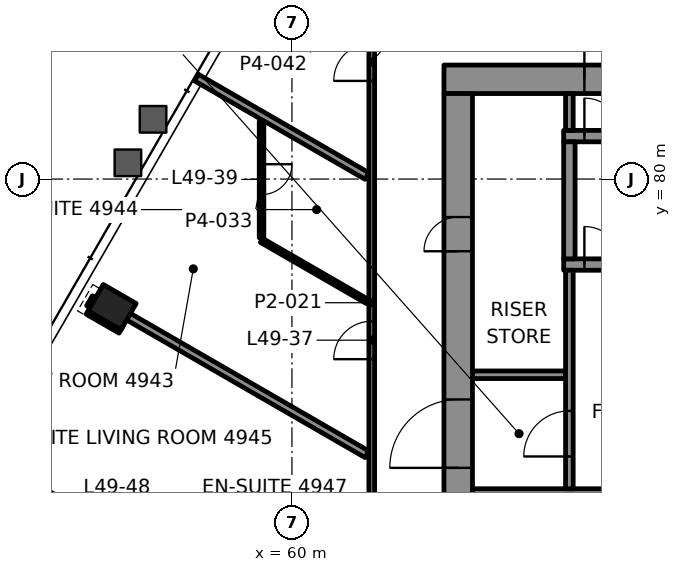
"""IFC4 building model, lengths in metres.
Left out: names, types, materials, properties, quantities, classifications, styles, units other than length and angle.
Written with IfcOpenShell. Run it as: python <this file> out.ifc"""

import sys

from ifc_helpers import new_model, si_unit, direction, frame, frame_2d, origin, origin_2d, place, context, subcontext, project, spatial, rectangle, hollow_rectangle, extrude, element, fill, save


model = new_model("IFC4")
c1 = context("Model", 3, precision=1e-05, world=origin(), true_north=direction((0.0, 1.0)))
c2 = subcontext(c1, "Body", "Model", "MODEL_VIEW")
j1 = project(units=[si_unit("LENGTHUNIT", "METRE"), si_unit("PLANEANGLEUNIT", "RADIAN")], contexts=[c1])
p1 = place(None, origin())
s1 = spatial("IfcSite", under=j1, at=p1, CompositionType="ELEMENT")
p2 = place(p1, origin())
s2 = spatial("IfcBuilding", under=s1, at=p2, CompositionType="ELEMENT")
p3 = place(p2, frame((0.0, 0.0, 210.4)))
s3 = spatial("IfcBuildingStorey", under=s2, at=p3, CompositionType="ELEMENT", Elevation=210.4)
p4 = place(p3, frame((55.268, 76.628, -0.0), z_axis=(0.0, 0.0, 1.0), x_axis=(-0.5, -0.866025403784, 0.0)))
e1 = element("IfcColumn", 1, at=p4, inside=s3, PredefinedType="COLUMN", context=c2, shape_type="SweptSolid", body=[
    extrude(hollow_rectangle(XDim=0.8, YDim=1.0, WallThickness=0.05, at=origin_2d()), origin(), (0.0, 0.0, 1.0), 3.9),
])
p5 = place(p3, frame((64.0, 82.625, 0.0), z_axis=(0.0, 0.0, 1.0), x_axis=(1.0, 0.0, 0.0)))
e2 = element("IfcWall", 2, at=p5, inside=s3, PredefinedType="SHEAR", context=c2, shape_type="SweptSolid", body=[
    extrude(rectangle(XDim=22.0, YDim=0.75, at=frame_2d((11.0, 0.0))), origin(), (0.0, 0.0, 1.0), 3.7),
])
p6 = place(p5, frame((3.695, 0.0, 0.0)))
e3 = element("IfcOpeningElement", 3, at=p6, cuts=e2, PredefinedType="OPENING", context=c2, shape_type="SweptSolid", body=[
    extrude(rectangle(XDim=1.0, YDim=2.1, at=frame_2d((0.5, 1.05))), frame((0.0, 0.385, 0.0), z_axis=(0.0, -1.0, 0.0), x_axis=(1.0, 0.0, 0.0)), (0.0, 0.0, 1.0), 0.77),
])
p7 = place(p5, frame((17.505, 0.0, 0.0)))
e4 = element("IfcOpeningElement", 4, at=p7, cuts=e2, PredefinedType="OPENING", context=c2, shape_type="SweptSolid", body=[
    extrude(rectangle(XDim=1.0, YDim=2.1, at=frame_2d((0.5, 1.05))), frame((0.0, 0.385, 0.0), z_axis=(0.0, -1.0, 0.0), x_axis=(1.0, 0.0, 0.0)), (0.0, 0.0, 1.0), 0.77),
])
p8 = place(p5, frame((10.65, 0.0, 0.0)))
e5 = element("IfcOpeningElement", 5, at=p8, cuts=e2, PredefinedType="OPENING", context=c2, shape_type="SweptSolid", body=[
    extrude(rectangle(XDim=0.9, YDim=2.1, at=frame_2d((0.45, 1.05))), frame((0.0, 0.385, 0.0), z_axis=(0.0, -1.0, 0.0), x_axis=(1.0, 0.0, 0.0)), (0.0, 0.0, 1.0), 0.77),
])
p9 = place(p3, frame((64.375, 67.75, 0.0), z_axis=(0.0, 0.0, 1.0), x_axis=(0.0, 1.0, 0.0)))
e6 = element("IfcWall", 6, at=p9, inside=s3, PredefinedType="SHEAR", context=c2, shape_type="SweptSolid", body=[
    extrude(rectangle(XDim=14.5, YDim=0.75, at=frame_2d((7.25, 0.0))), origin(), (0.0, 0.0, 1.0), 3.7),
])
p10 = place(p9, frame((4.65, 0.0, 0.0)))
e7 = element("IfcOpeningElement", 7, at=p10, cuts=e6, PredefinedType="OPENING", context=c2, shape_type="SweptSolid", body=[
    extrude(rectangle(XDim=1.8, YDim=2.1, at=frame_2d((0.9, 1.05))), frame((0.0, 0.385, 0.0), z_axis=(0.0, -1.0, 0.0), x_axis=(1.0, 0.0, 0.0)), (0.0, 0.0, 1.0), 0.77),
])
p11 = place(p9, frame((2.55, 0.0, 0.0)))
e8 = element("IfcOpeningElement", 8, at=p11, cuts=e6, PredefinedType="OPENING", context=c2, shape_type="SweptSolid", body=[
    extrude(rectangle(XDim=0.9, YDim=2.1, at=frame_2d((0.45, 1.05))), frame((0.0, 0.385, 0.0), z_axis=(0.0, -1.0, 0.0), x_axis=(1.0, 0.0, 0.0)), (0.0, 0.0, 1.0), 0.77),
])
p12 = place(p9, frame((10.35, 0.0, 0.0)))
e9 = element("IfcOpeningElement", 9, at=p12, cuts=e6, PredefinedType="OPENING", context=c2, shape_type="SweptSolid", body=[
    extrude(rectangle(XDim=0.9, YDim=2.1, at=frame_2d((0.45, 1.05))), frame((0.0, 0.385, 0.0), z_axis=(0.0, -1.0, 0.0), x_axis=(1.0, 0.0, 0.0)), (0.0, 0.0, 1.0), 0.77),
])
p13 = place(p3, frame((67.15, 77.75, 0.0), z_axis=(0.0, 0.0, 1.0), x_axis=(1.0, 0.0, 0.0)))
e10 = element("IfcWall", 10, at=p13, inside=s3, PredefinedType="SHEAR", context=c2, shape_type="SweptSolid", body=[
    extrude(rectangle(XDim=17.45, YDim=0.3, at=frame_2d((8.725, 0.0))), origin(), (0.0, 0.0, 1.0), 3.7),
])
p14 = place(p13, frame((0.545, 0.0, 0.0)))
e11 = element("IfcOpeningElement", 11, at=p14, cuts=e10, PredefinedType="OPENING", context=c2, shape_type="SweptSolid", body=[
    extrude(rectangle(XDim=1.0, YDim=2.1, at=frame_2d((0.5, 1.05))), frame((0.0, 0.16, 0.0), z_axis=(0.0, -1.0, 0.0), x_axis=(1.0, 0.0, 0.0)), (0.0, 0.0, 1.0), 0.32),
])
p15 = place(p3, frame((67.15, 81.13, 0.0), z_axis=(0.0, 0.0, 1.0), x_axis=(1.0, 0.0, 0.0)))
e12 = element("IfcWall", 12, at=p15, inside=s3, PredefinedType="SHEAR", context=c2, shape_type="SweptSolid", body=[
    extrude(rectangle(XDim=6.91, YDim=0.3, at=frame_2d((3.455, 0.0))), origin(), (0.0, 0.0, 1.0), 3.7),
])
p16 = place(p15, frame((0.545, 0.0, 0.0)))
e13 = element("IfcOpeningElement", 13, at=p16, cuts=e12, PredefinedType="OPENING", context=c2, shape_type="SweptSolid", body=[
    extrude(rectangle(XDim=1.0, YDim=2.1, at=frame_2d((0.5, 1.05))), frame((0.0, 0.16, 0.0), z_axis=(0.0, -1.0, 0.0), x_axis=(1.0, 0.0, 0.0)), (0.0, 0.0, 1.0), 0.32),
])
p17 = place(p3, frame((67.3, 77.9, 0.0), z_axis=(0.0, 0.0, 1.0), x_axis=(0.0, 1.0, 0.0)))
e14 = element("IfcWall", 14, at=p17, inside=s3, PredefinedType="SHEAR", context=c2, shape_type="SweptSolid", body=[
    extrude(rectangle(XDim=3.08, YDim=0.3, at=frame_2d((1.54, 0.0))), origin(), (0.0, 0.0, 1.0), 3.7),
])
p18 = place(p3, frame((54.685, 76.619, 0.0), z_axis=(0.0, 0.0, 1.0), x_axis=(0.499816412211, 0.866131372301, 0.0)))
e15 = element("IfcWall", 15, at=p18, inside=s3, PredefinedType="PARTITIONING", context=c2, shape_type="SweptSolid", body=[
    extrude(rectangle(XDim=0.3, YDim=0.2, at=frame_2d((0.15, 0.0))), origin(), (0.0, 0.0, 1.0), 3.1),
])
p19 = place(p3, frame((62.1, 68.591, 0.0), z_axis=(0.0, 0.0, 1.0), x_axis=(0.0, 1.0, 0.0)))
e16 = element("IfcWall", 16, at=p19, inside=s3, PredefinedType="PARTITIONING", context=c2, shape_type="SweptSolid", body=[
    extrude(rectangle(XDim=16.309, YDim=0.15, at=frame_2d((8.154, 0.0))), origin(), (0.0, 0.0, 1.0), 3.1),
])
p20 = place(p19, frame((6.668, 0.0, 0.0)))
e17 = element("IfcOpeningElement", 17, at=p20, cuts=e16, PredefinedType="OPENING", context=c2, shape_type="SweptSolid", body=[
    extrude(rectangle(XDim=1.0, YDim=2.1, at=frame_2d((0.5, 1.05))), frame((0.0, 0.085, 0.0), z_axis=(0.0, -1.0, 0.0), x_axis=(1.0, 0.0, 0.0)), (0.0, 0.0, 1.0), 0.17),
])
p21 = place(p19, frame((13.991, 0.0, 0.0)))
e18 = element("IfcOpeningElement", 18, at=p21, cuts=e16, PredefinedType="OPENING", context=c2, shape_type="SweptSolid", body=[
    extrude(rectangle(XDim=1.0, YDim=2.1, at=frame_2d((0.5, 1.05))), frame((0.0, 0.085, 0.0), z_axis=(0.0, -1.0, 0.0), x_axis=(1.0, 0.0, 0.0)), (0.0, 0.0, 1.0), 0.17),
])
p22 = place(p3, frame((59.2, 81.526, 0.0), z_axis=(0.0, 0.0, 1.0), x_axis=(0.0, -1.0, 0.0)))
e19 = element("IfcWall", 19, at=p22, inside=s3, PredefinedType="PARTITIONING", context=c2, shape_type="SweptSolid", body=[
    extrude(rectangle(XDim=3.07, YDim=0.12, at=frame_2d((1.535, 0.0))), origin(), (0.0, 0.0, 1.0), 3.1),
])
p23 = place(p22, frame((1.135, 0.0, 0.0)))
e20 = element("IfcOpeningElement", 20, at=p23, cuts=e19, PredefinedType="OPENING", context=c2, shape_type="SweptSolid", body=[
    extrude(rectangle(XDim=0.8, YDim=2.1, at=frame_2d((0.4, 1.05))), frame((0.0, 0.07, 0.0), z_axis=(0.0, -1.0, 0.0), x_axis=(1.0, 0.0, 0.0)), (0.0, 0.0, 1.0), 0.14),
])
p24 = place(p3, frame((61.973, 80.08, 0.0), z_axis=(0.0, 0.0, 1.0), x_axis=(-0.86601608377, 0.500016142392, 0.0)))
e21 = element("IfcWall", 21, at=p24, inside=s3, PredefinedType="PARTITIONING", context=c2, shape_type="SweptSolid", body=[
    extrude(rectangle(XDim=5.181, YDim=0.2, at=frame_2d((2.59, 0.0))), origin(), (0.0, 0.0, 1.0), 3.022),
])
p25 = place(p3, frame((61.99, 76.775, 0.0), z_axis=(0.0, 0.0, 1.0), x_axis=(-0.866010186656, 0.500026355914, 0.0)))
e22 = element("IfcWall", 22, at=p25, inside=s3, PredefinedType="PARTITIONING", context=c2, shape_type="SweptSolid", body=[
    extrude(rectangle(XDim=3.222, YDim=0.12, at=frame_2d((1.611, 0.0))), origin(), (0.0, 0.0, 1.0), 3.1),
])
p26 = place(p3, frame((61.973, 72.757, 0.0), z_axis=(0.0, 0.0, 1.0), x_axis=(-0.866027278279, 0.499996753267, 0.0)))
e23 = element("IfcWall", 23, at=p26, inside=s3, PredefinedType="PARTITIONING", context=c2, shape_type="SweptSolid", body=[
    extrude(rectangle(XDim=7.242, YDim=0.2, at=frame_2d((3.621, 0.0))), origin(), (0.0, 0.0, 1.0), 3.1),
])
p27 = place(p3, frame((55.501, 76.032, 0.0), z_axis=(0.0, 0.0, 1.0), x_axis=(-0.866010750942, 0.50002537861, 0.0)))
e24 = element("IfcWall", 24, at=p27, inside=s3, PredefinedType="PARTITIONING", context=c2, shape_type="SweptSolid", body=[
    extrude(rectangle(XDim=1.0, YDim=0.2, at=frame_2d((0.5, 0.0))), origin(), (0.0, 0.0, 1.0), 3.022),
])
p28 = place(p3, frame((57.571, 69.441, 0.0), z_axis=(0.0, 0.0, 1.0), x_axis=(-0.866019636692, 0.500009988763, 0.0)))
e25 = element("IfcWall", 25, at=p28, inside=s3, PredefinedType="PARTITIONING", context=c2, shape_type="SweptSolid", body=[
    extrude(rectangle(XDim=6.688, YDim=0.1, at=frame_2d((3.344, 0.0))), origin(), (0.0, 0.0, 1.0), 3.022),
])
p29 = place(p28, frame((2.644, 0.0, 0.0)))
e26 = element("IfcOpeningElement", 26, at=p29, cuts=e25, PredefinedType="OPENING", context=c2, shape_type="SweptSolid", body=[
    extrude(rectangle(XDim=0.9, YDim=2.1, at=frame_2d((0.45, 1.05))), frame((0.0, 0.06, 0.0), z_axis=(0.0, -1.0, 0.0), x_axis=(1.0, 0.0, 0.0)), (0.0, 0.0, 1.0), 0.12),
])
p30 = place(p3, frame((64.75, 71.75, 0.0), z_axis=(0.0, 0.0, 1.0), x_axis=(1.0, 0.0, 0.0)))
e27 = element("IfcWall", 27, at=p30, inside=s3, PredefinedType="PARTITIONING", context=c2, shape_type="SweptSolid", body=[
    extrude(rectangle(XDim=5.55, YDim=0.2, at=frame_2d((2.775, 0.0))), origin(), (0.0, 0.0, 1.0), 3.7),
])
p31 = place(p3, frame((64.75, 74.85, 0.0), z_axis=(0.0, 0.0, 1.0), x_axis=(1.0, 0.0, 0.0)))
e28 = element("IfcWall", 28, at=p31, inside=s3, PredefinedType="PARTITIONING", context=c2, shape_type="SweptSolid", body=[
    extrude(rectangle(XDim=2.45, YDim=0.2, at=frame_2d((1.225, 0.0))), origin(), (0.0, 0.0, 1.0), 3.7),
])
p32 = place(p3, frame((67.3, 71.85, 0.0), z_axis=(0.0, 0.0, 1.0), x_axis=(0.0, 1.0, 0.0)))
e29 = element("IfcWall", 29, at=p32, inside=s3, PredefinedType="PARTITIONING", context=c2, shape_type="SweptSolid", body=[
    extrude(rectangle(XDim=5.75, YDim=0.2, at=frame_2d((2.875, 0.0))), origin(), (0.0, 0.0, 1.0), 3.7),
])
p33 = place(p32, frame((0.85, 0.0, 0.0)))
e30 = element("IfcOpeningElement", 30, at=p33, cuts=e29, PredefinedType="OPENING", context=c2, shape_type="SweptSolid", body=[
    extrude(rectangle(XDim=1.2, YDim=2.1, at=frame_2d((0.6, 1.05))), frame((0.0, 0.11, 0.0), z_axis=(0.0, -1.0, 0.0), x_axis=(1.0, 0.0, 0.0)), (0.0, 0.0, 1.0), 0.22),
])
p34 = place(p3, frame((67.3, 81.28, 0.0), z_axis=(0.0, 0.0, 1.0), x_axis=(0.0, 1.0, 0.0)))
e31 = element("IfcWall", 31, at=p34, inside=s3, PredefinedType="PARTITIONING", context=c2, shape_type="SweptSolid", body=[
    extrude(rectangle(XDim=0.97, YDim=0.2, at=frame_2d((0.485, 0.0))), origin(), (0.0, 0.0, 1.0), 3.7),
])
p35 = place(p20, origin())
e32 = element("IfcDoor", 32, at=p35, inside=s3, OperationType="SINGLE_SWING_RIGHT", PredefinedType="DOOR", context=c2, shape_type="SweptSolid", body=[
    extrude(rectangle(XDim=1.0, YDim=2.1, at=frame_2d((0.5, 1.05))), frame((0.0, 0.025, 0.0), z_axis=(0.0, -1.0, 0.0), x_axis=(1.0, 0.0, 0.0)), (0.0, 0.0, 1.0), 0.05),
])
fill(e17, e32)
p36 = place(p21, origin())
e33 = element("IfcDoor", 33, at=p36, inside=s3, OperationType="SINGLE_SWING_RIGHT", PredefinedType="DOOR", context=c2, shape_type="SweptSolid", body=[
    extrude(rectangle(XDim=1.0, YDim=2.1, at=frame_2d((0.5, 1.05))), frame((0.0, 0.025, 0.0), z_axis=(0.0, -1.0, 0.0), x_axis=(1.0, 0.0, 0.0)), (0.0, 0.0, 1.0), 0.05),
])
fill(e18, e33)
p37 = place(p23, origin())
e34 = element("IfcDoor", 34, at=p37, inside=s3, OperationType="SINGLE_SWING_RIGHT", PredefinedType="DOOR", context=c2, shape_type="SweptSolid", body=[
    extrude(rectangle(XDim=0.8, YDim=2.1, at=frame_2d((0.4, 1.05))), frame((0.0, 0.025, 0.0), z_axis=(0.0, -1.0, 0.0), x_axis=(1.0, 0.0, 0.0)), (0.0, 0.0, 1.0), 0.05),
])
fill(e20, e34)
p38 = place(p14, origin())
e35 = element("IfcDoor", 35, at=p38, inside=s3, OperationType="SINGLE_SWING_LEFT", PredefinedType="DOOR", context=c2, shape_type="SweptSolid", body=[
    extrude(rectangle(XDim=1.0, YDim=2.1, at=frame_2d((0.5, 1.05))), frame((0.0, 0.025, 0.0), z_axis=(0.0, -1.0, 0.0), x_axis=(1.0, 0.0, 0.0)), (0.0, 0.0, 1.0), 0.05),
])
fill(e11, e35)
p39 = place(p16, origin())
e36 = element("IfcDoor", 36, at=p39, inside=s3, OperationType="SINGLE_SWING_RIGHT", PredefinedType="DOOR", context=c2, shape_type="SweptSolid", body=[
    extrude(rectangle(XDim=1.0, YDim=2.1, at=frame_2d((0.5, 1.05))), frame((0.0, 0.025, 0.0), z_axis=(0.0, -1.0, 0.0), x_axis=(1.0, 0.0, 0.0)), (0.0, 0.0, 1.0), 0.05),
])
fill(e13, e36)
p40 = place(p6, origin())
e37 = element("IfcDoor", 37, at=p40, inside=s3, OperationType="SINGLE_SWING_LEFT", PredefinedType="DOOR", context=c2, shape_type="SweptSolid", body=[
    extrude(rectangle(XDim=1.0, YDim=2.1, at=frame_2d((0.5, 1.05))), frame((0.0, 0.095, 0.0), z_axis=(0.0, -1.0, 0.0), x_axis=(1.0, 0.0, 0.0)), (0.0, 0.0, 1.0), 0.19),
])
fill(e3, e37)
p41 = place(p33, origin())
e38 = element("IfcDoor", 38, at=p41, inside=s3, OperationType="SINGLE_SWING_RIGHT", PredefinedType="DOOR", context=c2, shape_type="SweptSolid", body=[
    extrude(rectangle(XDim=1.2, YDim=2.1, at=frame_2d((0.6, 1.05))), frame((0.0, 0.025, 0.0), z_axis=(0.0, -1.0, 0.0), x_axis=(1.0, 0.0, 0.0)), (0.0, 0.0, 1.0), 0.05),
])
fill(e30, e38)
p42 = place(p10, origin())
e39 = element("IfcDoor", 39, at=p42, inside=s3, OperationType="SINGLE_SWING_LEFT", PredefinedType="DOOR", context=c2, shape_type="SweptSolid", body=[
    extrude(rectangle(XDim=1.8, YDim=2.1, at=frame_2d((0.9, 1.05))), frame((0.0, 0.095, 0.0), z_axis=(0.0, -1.0, 0.0), x_axis=(1.0, 0.0, 0.0)), (0.0, 0.0, 1.0), 0.19),
])
fill(e7, e39)
p43 = place(p12, origin())
e40 = element("IfcDoor", 40, at=p43, inside=s3, OperationType="SINGLE_SWING_RIGHT", PredefinedType="DOOR", context=c2, shape_type="SweptSolid", body=[
    extrude(rectangle(XDim=0.9, YDim=2.1, at=frame_2d((0.45, 1.05))), frame((0.0, 0.095, 0.0), z_axis=(0.0, -1.0, 0.0), x_axis=(1.0, 0.0, 0.0)), (0.0, 0.0, 1.0), 0.19),
])
fill(e9, e40)
save(model, sys.argv[1])
